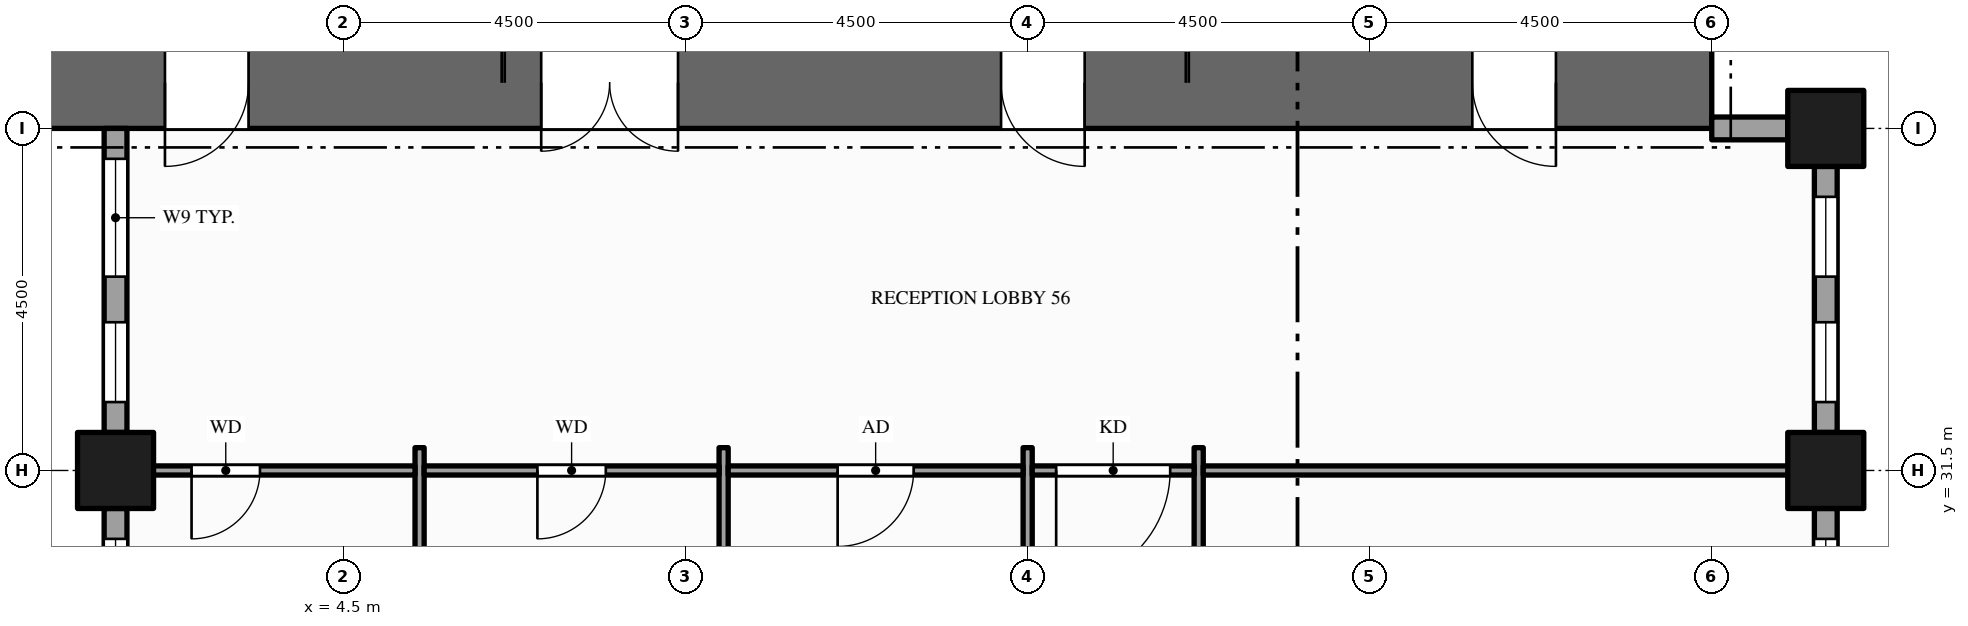
"""IFC4 building model, lengths in metres.
Left out: names, types, materials, properties, quantities, classifications, styles, units other than length and angle.
Written with IfcOpenShell. Run it as: python <this file> out.ifc"""

import sys

from ifc_helpers import new_model, si_unit, direction, frame, frame_2d, origin, origin_2d, place, context, subcontext, project, spatial, rectangle, hollow_rectangle, extrude, element, fill, save


model = new_model("IFC4")
c1 = context("Model", 3, precision=1e-05, world=origin(), true_north=direction((0.0, 1.0)))
c2 = subcontext(c1, "Body", "Model", "MODEL_VIEW")
j1 = project(units=[si_unit("LENGTHUNIT", "METRE"), si_unit("PLANEANGLEUNIT", "RADIAN")], contexts=[c1])
p1 = place(None, origin())
s1 = spatial("IfcSite", under=j1, at=p1, CompositionType="ELEMENT")
p2 = place(p1, origin())
s2 = spatial("IfcBuilding", under=s1, at=p2, CompositionType="ELEMENT")
p3 = place(p2, frame((0.0, 0.0, 95.0)))
s3 = spatial("IfcBuildingStorey", under=s2, at=p3, CompositionType="ELEMENT", Elevation=95.0)
p4 = place(p3, frame((0.0, 36.6, -0.15), z_axis=(0.0, 0.0, 1.0), x_axis=(1.0, 0.0, 0.0)))
e1 = element("IfcWall", 1, at=p4, inside=s3, PredefinedType="SHEAR", context=c2, shape_type="SweptSolid", body=[
    extrude(rectangle(XDim=22.5, YDim=1.2, at=frame_2d((11.25, 0.0))), origin(), (0.0, 0.0, 1.0), 4.0),
])
p5 = place(p4, frame((7.1, 0.0, 0.15)))
e2 = element("IfcOpeningElement", 2, at=p5, cuts=e1, PredefinedType="OPENING", context=c2, shape_type="SweptSolid", body=[
    extrude(rectangle(XDim=1.8, YDim=2.1, at=frame_2d((0.9, 1.05))), frame((0.0, 0.61, 0.0), z_axis=(0.0, -1.0, 0.0), x_axis=(1.0, 0.0, 0.0)), (0.0, 0.0, 1.0), 1.22),
])
p6 = place(p4, frame((13.15, 0.0, 0.15)))
e3 = element("IfcOpeningElement", 3, at=p6, cuts=e1, PredefinedType="OPENING", context=c2, shape_type="SweptSolid", body=[
    extrude(rectangle(XDim=1.1, YDim=2.1, at=frame_2d((0.55, 1.05))), frame((0.0, 0.61, 0.0), z_axis=(0.0, -1.0, 0.0), x_axis=(1.0, 0.0, 0.0)), (0.0, 0.0, 1.0), 1.22),
])
p7 = place(p4, frame((2.15, 0.0, 0.15)))
e4 = element("IfcOpeningElement", 4, at=p7, cuts=e1, PredefinedType="OPENING", context=c2, shape_type="SweptSolid", body=[
    extrude(rectangle(XDim=1.1, YDim=2.1, at=frame_2d((0.55, 1.05))), frame((0.0, 0.61, 0.0), z_axis=(0.0, -1.0, 0.0), x_axis=(1.0, 0.0, 0.0)), (0.0, 0.0, 1.0), 1.22),
])
p8 = place(p4, frame((19.35, 0.0, 0.15)))
e5 = element("IfcOpeningElement", 5, at=p8, cuts=e1, PredefinedType="OPENING", context=c2, shape_type="SweptSolid", body=[
    extrude(rectangle(XDim=1.1, YDim=2.1, at=frame_2d((0.55, 1.05))), frame((0.0, 0.61, 0.0), z_axis=(0.0, -1.0, 0.0), x_axis=(1.0, 0.0, 0.0)), (0.0, 0.0, 1.0), 1.22),
])
for number, where, z_axis, x_axis in (
    (6, (1.5, 31.5, -0.15), (0.0, 0.0, 1.0), (1.0, 0.0, 0.0)),
    (7, (24.0, 31.5, -0.15), (0.0, 0.0, 1.0), (1.0, 0.0, 0.0)),
    (8, (24.0, 36.0, -0.15), (0.0, 0.0, 1.0), (1.0, 0.0, 0.0)),
):
    element("IfcColumn", number, at=place(p3, frame(where, z_axis=z_axis, x_axis=x_axis)), inside=s3, PredefinedType="COLUMN", context=c2, shape_type="SweptSolid", body=[
        extrude(hollow_rectangle(XDim=1.0, YDim=1.0, WallThickness=0.05, at=origin_2d()), origin(), (0.0, 0.0, 1.0), 4.0),
    ])
p9 = place(p3, frame((24.0, 26.0, 0.0), z_axis=(0.0, 0.0, 1.0), x_axis=(0.0, 1.0, 0.0)))
e9 = element("IfcWall", 9, at=p9, inside=s3, PredefinedType="STANDARD", context=c2, shape_type="SweptSolid", body=[
    extrude(rectangle(XDim=5.0, YDim=0.3, at=frame_2d((2.5, 0.0))), origin(), (0.0, 0.0, 1.0), 3.154),
])
p10 = place(p9, frame((1.3, 0.0, 0.9)))
e10 = element("IfcOpeningElement", 10, at=p10, cuts=e9, PredefinedType="OPENING", context=c2, shape_type="SweptSolid", body=[
    extrude(rectangle(XDim=1.65, YDim=2.0, at=frame_2d((0.825, 1.0))), frame((0.0, 0.16, 0.0), z_axis=(0.0, -1.0, 0.0), x_axis=(1.0, 0.0, 0.0)), (0.0, 0.0, 1.0), 0.32),
])
p11 = place(p9, frame((3.55, 0.0, 0.9)))
e11 = element("IfcOpeningElement", 11, at=p11, cuts=e9, PredefinedType="OPENING", context=c2, shape_type="SweptSolid", body=[
    extrude(rectangle(XDim=1.05, YDim=2.0, at=frame_2d((0.525, 1.0))), frame((0.0, 0.16, 0.0), z_axis=(0.0, -1.0, 0.0), x_axis=(1.0, 0.0, 0.0)), (0.0, 0.0, 1.0), 0.32),
])
p12 = place(p3, frame((24.0, 32.0, 0.0), z_axis=(0.0, 0.0, 1.0), x_axis=(0.0, 1.0, 0.0)))
e12 = element("IfcWall", 12, at=p12, inside=s3, PredefinedType="STANDARD", context=c2, shape_type="SweptSolid", body=[
    extrude(rectangle(XDim=3.5, YDim=0.3, at=frame_2d((1.75, 0.0))), origin(), (0.0, 0.0, 1.0), 3.154),
])
p13 = place(p12, frame((0.4, 0.0, 0.9)))
e13 = element("IfcOpeningElement", 13, at=p13, cuts=e12, PredefinedType="OPENING", context=c2, shape_type="SweptSolid", body=[
    extrude(rectangle(XDim=1.05, YDim=2.0, at=frame_2d((0.525, 1.0))), frame((0.0, 0.16, 0.0), z_axis=(0.0, -1.0, 0.0), x_axis=(1.0, 0.0, 0.0)), (0.0, 0.0, 1.0), 0.32),
])
p14 = place(p12, frame((2.05, 0.0, 0.9)))
e14 = element("IfcOpeningElement", 14, at=p14, cuts=e12, PredefinedType="OPENING", context=c2, shape_type="SweptSolid", body=[
    extrude(rectangle(XDim=1.05, YDim=2.0, at=frame_2d((0.525, 1.0))), frame((0.0, 0.16, 0.0), z_axis=(0.0, -1.0, 0.0), x_axis=(1.0, 0.0, 0.0)), (0.0, 0.0, 1.0), 0.32),
])
p15 = place(p3, frame((23.5, 36.0, 0.0), z_axis=(0.0, 0.0, 1.0), x_axis=(-1.0, 0.0, 0.0)))
e15 = element("IfcWall", 15, at=p15, inside=s3, PredefinedType="STANDARD", context=c2, shape_type="SweptSolid", body=[
    extrude(rectangle(XDim=1.0, YDim=0.3, at=frame_2d((0.5, 0.0))), origin(), (0.0, 0.0, 1.0), 2.938),
])
p16 = place(p3, frame((1.5, 36.0, 0.0), z_axis=(0.0, 0.0, 1.0), x_axis=(0.0, -1.0, 0.0)))
e16 = element("IfcWall", 16, at=p16, inside=s3, PredefinedType="STANDARD", context=c2, shape_type="SweptSolid", body=[
    extrude(rectangle(XDim=4.0, YDim=0.3, at=frame_2d((2.0, 0.0))), origin(), (0.0, 0.0, 1.0), 3.154),
])
p17 = place(p16, frame((0.4, 0.0, 0.9)))
e17 = element("IfcOpeningElement", 17, at=p17, cuts=e16, PredefinedType="OPENING", context=c2, shape_type="SweptSolid", body=[
    extrude(rectangle(XDim=1.55, YDim=2.0, at=frame_2d((0.775, 1.0))), frame((0.0, 0.16, 0.0), z_axis=(0.0, -1.0, 0.0), x_axis=(1.0, 0.0, 0.0)), (0.0, 0.0, 1.0), 0.32),
])
p18 = place(p16, frame((2.55, 0.0, 0.9)))
e18 = element("IfcOpeningElement", 18, at=p18, cuts=e16, PredefinedType="OPENING", context=c2, shape_type="SweptSolid", body=[
    extrude(rectangle(XDim=1.05, YDim=2.0, at=frame_2d((0.525, 1.0))), frame((0.0, 0.16, 0.0), z_axis=(0.0, -1.0, 0.0), x_axis=(1.0, 0.0, 0.0)), (0.0, 0.0, 1.0), 0.32),
])
p19 = place(p3, frame((1.5, 31.0, 0.0), z_axis=(0.0, 0.0, 1.0), x_axis=(0.0, -1.0, 0.0)))
e19 = element("IfcWall", 19, at=p19, inside=s3, PredefinedType="STANDARD", context=c2, shape_type="SweptSolid", body=[
    extrude(rectangle(XDim=3.5, YDim=0.3, at=frame_2d((1.75, 0.0))), origin(), (0.0, 0.0, 1.0), 3.154),
])
p20 = place(p19, frame((0.4, 0.0, 0.9)))
e20 = element("IfcOpeningElement", 20, at=p20, cuts=e19, PredefinedType="OPENING", context=c2, shape_type="SweptSolid", body=[
    extrude(rectangle(XDim=1.05, YDim=2.0, at=frame_2d((0.525, 1.0))), frame((0.0, 0.16, 0.0), z_axis=(0.0, -1.0, 0.0), x_axis=(1.0, 0.0, 0.0)), (0.0, 0.0, 1.0), 0.32),
])
p21 = place(p19, frame((2.05, 0.0, 0.9)))
e21 = element("IfcOpeningElement", 21, at=p21, cuts=e19, PredefinedType="OPENING", context=c2, shape_type="SweptSolid", body=[
    extrude(rectangle(XDim=1.05, YDim=2.0, at=frame_2d((0.525, 1.0))), frame((0.0, 0.16, 0.0), z_axis=(0.0, -1.0, 0.0), x_axis=(1.0, 0.0, 0.0)), (0.0, 0.0, 1.0), 0.32),
])
for number, where, z_axis, x_axis in (
    (22, (5.5, 26.7, 0.0), (0.0, 0.0, 1.0), (0.0, 1.0, 0.0)),
    (23, (9.5, 26.7, 0.0), (0.0, 0.0, 1.0), (0.0, 1.0, 0.0)),
):
    element("IfcWall", number, at=place(p3, frame(where, z_axis=z_axis, x_axis=x_axis)), inside=s3, PredefinedType="PARTITIONING", context=c2, shape_type="SweptSolid", body=[
        extrude(rectangle(XDim=5.1, YDim=0.12, at=frame_2d((2.55, 0.0))), origin(), (0.0, 0.0, 1.0), 3.85),
    ])
p22 = place(p3, frame((13.5, 10.95, 0.0), z_axis=(0.0, 0.0, 1.0), x_axis=(0.0, 1.0, 0.0)))
e24 = element("IfcWall", 24, at=p22, inside=s3, PredefinedType="PARTITIONING", context=c2, shape_type="SweptSolid", body=[
    extrude(rectangle(XDim=20.85, YDim=0.12, at=frame_2d((10.425, 0.0))), origin(), (0.0, 0.0, 1.0), 2.6),
])
p23 = place(p22, frame((2.05, 0.0, 0.0)))
e25 = element("IfcOpeningElement", 25, at=p23, cuts=e24, PredefinedType="OPENING", context=c2, shape_type="SweptSolid", body=[
    extrude(rectangle(XDim=1.0, YDim=2.1, at=frame_2d((0.5, 1.05))), frame((0.0, 0.07, 0.0), z_axis=(0.0, -1.0, 0.0), x_axis=(1.0, 0.0, 0.0)), (0.0, 0.0, 1.0), 0.14),
])
p24 = place(p22, frame((6.55, 0.0, 0.0)))
e26 = element("IfcOpeningElement", 26, at=p24, cuts=e24, PredefinedType="OPENING", context=c2, shape_type="SweptSolid", body=[
    extrude(rectangle(XDim=1.0, YDim=2.1, at=frame_2d((0.5, 1.05))), frame((0.0, 0.07, 0.0), z_axis=(0.0, -1.0, 0.0), x_axis=(1.0, 0.0, 0.0)), (0.0, 0.0, 1.0), 0.14),
])
p25 = place(p22, frame((12.205, 0.0, 0.0)))
e27 = element("IfcOpeningElement", 27, at=p25, cuts=e24, PredefinedType="OPENING", context=c2, shape_type="SweptSolid", body=[
    extrude(rectangle(XDim=1.0, YDim=2.1, at=frame_2d((0.5, 1.05))), frame((0.0, 0.07, 0.0), z_axis=(0.0, -1.0, 0.0), x_axis=(1.0, 0.0, 0.0)), (0.0, 0.0, 1.0), 0.14),
])
p26 = place(p3, frame((15.75, 10.95, 0.0), z_axis=(0.0, 0.0, 1.0), x_axis=(0.0, 1.0, 0.0)))
e28 = element("IfcWall", 28, at=p26, inside=s3, PredefinedType="PARTITIONING", context=c2, shape_type="SweptSolid", body=[
    extrude(rectangle(XDim=20.85, YDim=0.12, at=frame_2d((10.425, 0.0))), origin(), (0.0, 0.0, 1.0), 2.6),
])
p27 = place(p26, frame((17.7, 0.0, 0.0)))
e29 = element("IfcOpeningElement", 29, at=p27, cuts=e28, PredefinedType="OPENING", context=c2, shape_type="SweptSolid", body=[
    extrude(rectangle(XDim=1.2, YDim=2.1, at=frame_2d((0.6, 1.05))), frame((0.0, 0.07, 0.0), z_axis=(0.0, -1.0, 0.0), x_axis=(1.0, 0.0, 0.0)), (0.0, 0.0, 1.0), 0.14),
])
p28 = place(p26, frame((4.2, 0.0, 0.0)))
e30 = element("IfcOpeningElement", 30, at=p28, cuts=e28, PredefinedType="OPENING", context=c2, shape_type="SweptSolid", body=[
    extrude(rectangle(XDim=1.2, YDim=2.1, at=frame_2d((0.6, 1.05))), frame((0.0, 0.07, 0.0), z_axis=(0.0, -1.0, 0.0), x_axis=(1.0, 0.0, 0.0)), (0.0, 0.0, 1.0), 0.14),
])
p29 = place(p3, frame((1.65, 31.5, 0.0), z_axis=(0.0, 0.0, 1.0), x_axis=(1.0, 0.0, 0.0)))
e31 = element("IfcWall", 31, at=p29, inside=s3, PredefinedType="PARTITIONING", context=c2, shape_type="SweptSolid", body=[
    extrude(rectangle(XDim=3.79, YDim=0.12, at=frame_2d((1.895, 0.0))), origin(), (0.0, 0.0, 1.0), 2.938),
])
p30 = place(p29, frame((0.85, 0.0, 0.0)))
e32 = element("IfcOpeningElement", 32, at=p30, cuts=e31, PredefinedType="OPENING", context=c2, shape_type="SweptSolid", body=[
    extrude(rectangle(XDim=0.9, YDim=2.1, at=frame_2d((0.45, 1.05))), frame((0.0, 0.07, 0.0), z_axis=(0.0, -1.0, 0.0), x_axis=(1.0, 0.0, 0.0)), (0.0, 0.0, 1.0), 0.14),
])
p31 = place(p3, frame((5.56, 31.5, 0.0), z_axis=(0.0, 0.0, 1.0), x_axis=(1.0, 0.0, 0.0)))
e33 = element("IfcWall", 33, at=p31, inside=s3, PredefinedType="PARTITIONING", context=c2, shape_type="SweptSolid", body=[
    extrude(rectangle(XDim=3.88, YDim=0.12, at=frame_2d((1.94, 0.0))), origin(), (0.0, 0.0, 1.0), 2.938),
])
p32 = place(p31, frame((1.49, 0.0, 0.0)))
e34 = element("IfcOpeningElement", 34, at=p32, cuts=e33, PredefinedType="OPENING", context=c2, shape_type="SweptSolid", body=[
    extrude(rectangle(XDim=0.9, YDim=2.1, at=frame_2d((0.45, 1.05))), frame((0.0, 0.07, 0.0), z_axis=(0.0, -1.0, 0.0), x_axis=(1.0, 0.0, 0.0)), (0.0, 0.0, 1.0), 0.14),
])
p33 = place(p3, frame((9.56, 31.5, 0.0), z_axis=(0.0, 0.0, 1.0), x_axis=(1.0, 0.0, 0.0)))
e35 = element("IfcWall", 35, at=p33, inside=s3, PredefinedType="PARTITIONING", context=c2, shape_type="SweptSolid", body=[
    extrude(rectangle(XDim=3.88, YDim=0.12, at=frame_2d((1.94, 0.0))), origin(), (0.0, 0.0, 1.0), 2.938),
])
p34 = place(p33, frame((1.44, 0.0, 0.0)))
e36 = element("IfcOpeningElement", 36, at=p34, cuts=e35, PredefinedType="OPENING", context=c2, shape_type="SweptSolid", body=[
    extrude(rectangle(XDim=1.0, YDim=2.1, at=frame_2d((0.5, 1.05))), frame((0.0, 0.07, 0.0), z_axis=(0.0, -1.0, 0.0), x_axis=(1.0, 0.0, 0.0)), (0.0, 0.0, 1.0), 0.14),
])
p35 = place(p3, frame((13.56, 31.5, 0.0), z_axis=(0.0, 0.0, 1.0), x_axis=(1.0, 0.0, 0.0)))
e37 = element("IfcWall", 37, at=p35, inside=s3, PredefinedType="PARTITIONING", context=c2, shape_type="SweptSolid", body=[
    extrude(rectangle(XDim=2.13, YDim=0.12, at=frame_2d((1.065, 0.0))), origin(), (0.0, 0.0, 1.0), 2.938),
])
p36 = place(p35, frame((0.315, 0.0, 0.0)))
e38 = element("IfcOpeningElement", 38, at=p36, cuts=e37, PredefinedType="OPENING", context=c2, shape_type="SweptSolid", body=[
    extrude(rectangle(XDim=1.5, YDim=2.1, at=frame_2d((0.75, 1.05))), frame((0.0, 0.07, 0.0), z_axis=(0.0, -1.0, 0.0), x_axis=(1.0, 0.0, 0.0)), (0.0, 0.0, 1.0), 0.14),
])
p37 = place(p3, frame((15.81, 31.5, 0.0), z_axis=(0.0, 0.0, 1.0), x_axis=(1.0, 0.0, 0.0)))
e39 = element("IfcWall", 39, at=p37, inside=s3, PredefinedType="PARTITIONING", context=c2, shape_type="SweptSolid", body=[
    extrude(rectangle(XDim=8.04, YDim=0.12, at=frame_2d((4.02, 0.0))), origin(), (0.0, 0.0, 1.0), 2.938),
])
p38 = place(p11, origin())
e40 = element("IfcWindow", 40, at=p38, inside=s3, PartitioningType="SINGLE_PANEL", PredefinedType="WINDOW", context=c2, shape_type="SweptSolid", body=[
    extrude(rectangle(XDim=1.05, YDim=2.0, at=frame_2d((0.525, 1.0))), frame((0.0, 0.03, 0.0), z_axis=(0.0, -1.0, 0.0), x_axis=(1.0, 0.0, 0.0)), (0.0, 0.0, 1.0), 0.06),
])
fill(e11, e40)
p39 = place(p13, origin())
e41 = element("IfcWindow", 41, at=p39, inside=s3, PartitioningType="SINGLE_PANEL", PredefinedType="WINDOW", context=c2, shape_type="SweptSolid", body=[
    extrude(rectangle(XDim=1.05, YDim=2.0, at=frame_2d((0.525, 1.0))), frame((0.0, 0.03, 0.0), z_axis=(0.0, -1.0, 0.0), x_axis=(1.0, 0.0, 0.0)), (0.0, 0.0, 1.0), 0.06),
])
fill(e13, e41)
p40 = place(p14, origin())
e42 = element("IfcWindow", 42, at=p40, inside=s3, PartitioningType="SINGLE_PANEL", PredefinedType="WINDOW", context=c2, shape_type="SweptSolid", body=[
    extrude(rectangle(XDim=1.05, YDim=2.0, at=frame_2d((0.525, 1.0))), frame((0.0, 0.03, 0.0), z_axis=(0.0, -1.0, 0.0), x_axis=(1.0, 0.0, 0.0)), (0.0, 0.0, 1.0), 0.06),
])
fill(e14, e42)
p41 = place(p17, origin())
e43 = element("IfcWindow", 43, at=p41, inside=s3, PartitioningType="SINGLE_PANEL", PredefinedType="WINDOW", context=c2, shape_type="SweptSolid", body=[
    extrude(rectangle(XDim=1.55, YDim=2.0, at=frame_2d((0.775, 1.0))), frame((0.0, 0.03, 0.0), z_axis=(0.0, -1.0, 0.0), x_axis=(1.0, 0.0, 0.0)), (0.0, 0.0, 1.0), 0.06),
])
fill(e17, e43)
p42 = place(p18, origin())
e44 = element("IfcWindow", 44, at=p42, inside=s3, PartitioningType="SINGLE_PANEL", PredefinedType="WINDOW", context=c2, shape_type="SweptSolid", body=[
    extrude(rectangle(XDim=1.05, YDim=2.0, at=frame_2d((0.525, 1.0))), frame((0.0, 0.03, 0.0), z_axis=(0.0, -1.0, 0.0), x_axis=(1.0, 0.0, 0.0)), (0.0, 0.0, 1.0), 0.06),
])
fill(e18, e44)
p43 = place(p20, origin())
e45 = element("IfcWindow", 45, at=p43, inside=s3, PartitioningType="SINGLE_PANEL", PredefinedType="WINDOW", context=c2, shape_type="SweptSolid", body=[
    extrude(rectangle(XDim=1.05, YDim=2.0, at=frame_2d((0.525, 1.0))), frame((0.0, 0.03, 0.0), z_axis=(0.0, -1.0, 0.0), x_axis=(1.0, 0.0, 0.0)), (0.0, 0.0, 1.0), 0.06),
])
fill(e20, e45)
p44 = place(p5, origin())
e46 = element("IfcDoor", 46, at=p44, inside=s3, OperationType="DOUBLE_DOOR_SINGLE_SWING", PredefinedType="DOOR", context=c2, shape_type="SweptSolid", body=[
    extrude(rectangle(XDim=1.8, YDim=2.1, at=frame_2d((0.9, 1.05))), frame((0.0, 0.025, 0.0), z_axis=(0.0, -1.0, 0.0), x_axis=(1.0, 0.0, 0.0)), (0.0, 0.0, 1.0), 0.05),
])
fill(e2, e46)
p45 = place(p6, origin())
e47 = element("IfcDoor", 47, at=p45, inside=s3, OperationType="SINGLE_SWING_RIGHT", PredefinedType="DOOR", context=c2, shape_type="SweptSolid", body=[
    extrude(rectangle(XDim=1.1, YDim=2.1, at=frame_2d((0.55, 1.05))), frame((0.0, 0.025, 0.0), z_axis=(0.0, -1.0, 0.0), x_axis=(1.0, 0.0, 0.0)), (0.0, 0.0, 1.0), 0.05),
])
fill(e3, e47)
p46 = place(p7, origin())
e48 = element("IfcDoor", 48, at=p46, inside=s3, OperationType="SINGLE_SWING_LEFT", PredefinedType="DOOR", context=c2, shape_type="SweptSolid", body=[
    extrude(rectangle(XDim=1.1, YDim=2.1, at=frame_2d((0.55, 1.05))), frame((0.0, 0.025, 0.0), z_axis=(0.0, -1.0, 0.0), x_axis=(1.0, 0.0, 0.0)), (0.0, 0.0, 1.0), 0.05),
])
fill(e4, e48)
p47 = place(p8, origin())
e49 = element("IfcDoor", 49, at=p47, inside=s3, OperationType="SINGLE_SWING_RIGHT", PredefinedType="DOOR", context=c2, shape_type="SweptSolid", body=[
    extrude(rectangle(XDim=1.1, YDim=2.1, at=frame_2d((0.55, 1.05))), frame((0.0, 0.025, 0.0), z_axis=(0.0, -1.0, 0.0), x_axis=(1.0, 0.0, 0.0)), (0.0, 0.0, 1.0), 0.05),
])
fill(e5, e49)
p48 = place(p36, origin())
e50 = element("IfcDoor", 50, at=p48, inside=s3, OperationType="SINGLE_SWING_LEFT", PredefinedType="DOOR", context=c2, shape_type="SweptSolid", body=[
    extrude(rectangle(XDim=1.5, YDim=2.1, at=frame_2d((0.75, 1.05))), frame((0.0, 0.025, 0.0), z_axis=(0.0, -1.0, 0.0), x_axis=(1.0, 0.0, 0.0)), (0.0, 0.0, 1.0), 0.05),
])
fill(e38, e50)
p49 = place(p30, origin())
e51 = element("IfcDoor", 51, at=p49, inside=s3, OperationType="SINGLE_SWING_LEFT", PredefinedType="DOOR", context=c2, shape_type="SweptSolid", body=[
    extrude(rectangle(XDim=0.9, YDim=2.1, at=frame_2d((0.45, 1.05))), frame((0.0, 0.025, 0.0), z_axis=(0.0, -1.0, 0.0), x_axis=(1.0, 0.0, 0.0)), (0.0, 0.0, 1.0), 0.05),
])
fill(e32, e51)
p50 = place(p32, origin())
e52 = element("IfcDoor", 52, at=p50, inside=s3, OperationType="SINGLE_SWING_LEFT", PredefinedType="DOOR", context=c2, shape_type="SweptSolid", body=[
    extrude(rectangle(XDim=0.9, YDim=2.1, at=frame_2d((0.45, 1.05))), frame((0.0, 0.025, 0.0), z_axis=(0.0, -1.0, 0.0), x_axis=(1.0, 0.0, 0.0)), (0.0, 0.0, 1.0), 0.05),
])
fill(e34, e52)
p51 = place(p34, origin())
e53 = element("IfcDoor", 53, at=p51, inside=s3, OperationType="SINGLE_SWING_LEFT", PredefinedType="DOOR", context=c2, shape_type="SweptSolid", body=[
    extrude(rectangle(XDim=1.0, YDim=2.1, at=frame_2d((0.5, 1.05))), frame((0.0, 0.025, 0.0), z_axis=(0.0, -1.0, 0.0), x_axis=(1.0, 0.0, 0.0)), (0.0, 0.0, 1.0), 0.05),
])
fill(e36, e53)
save(model, sys.argv[1])
